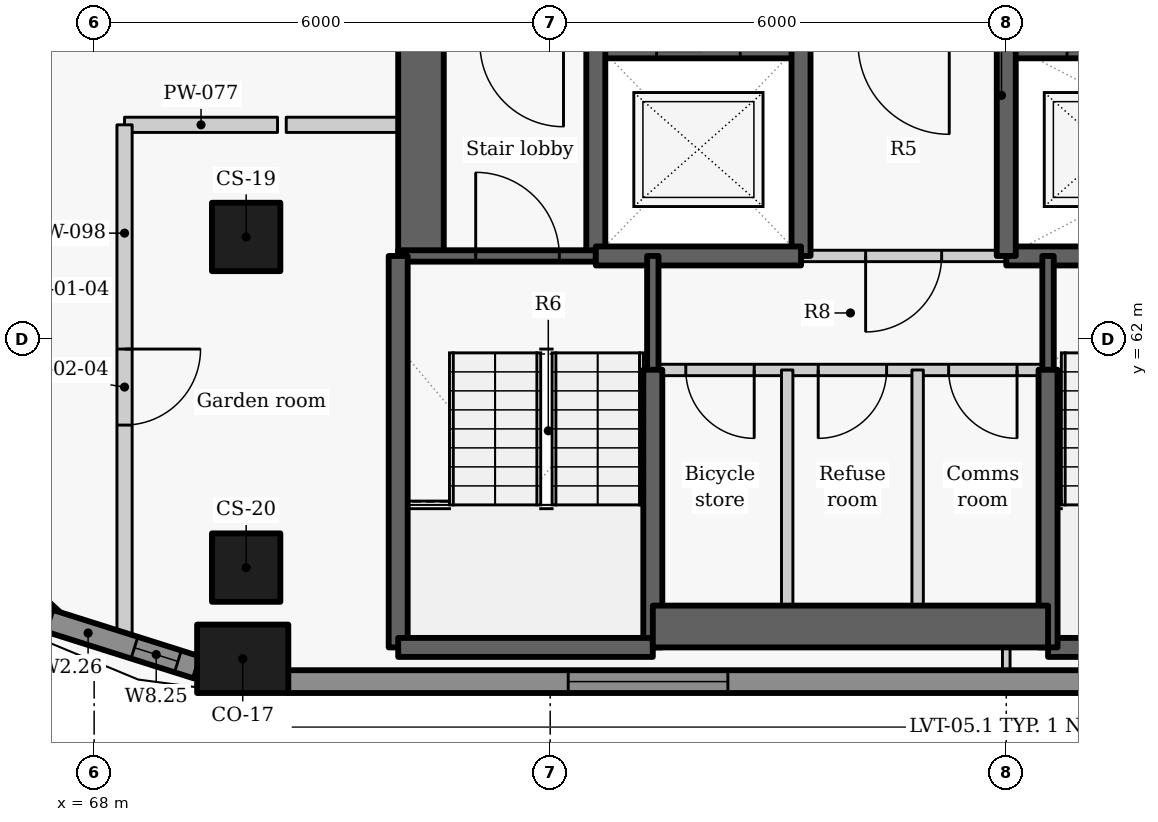
"""IFC4 building model, lengths in metres.
Left out: names, types, materials, properties, quantities, classifications, styles, units other than length and angle.
Written with IfcOpenShell. Run it as: python <this file> out.ifc"""

import sys

from ifc_helpers import new_model, si_unit, direction, frame, frame_2d, origin, origin_2d, place, context, subcontext, project, spatial, rectangle, extrude, element, fill, save


model = new_model("IFC4")
c1 = context("Model", 3, precision=1e-05, world=origin(), true_north=direction((0.0, 1.0)))
c2 = subcontext(c1, "Body", "Model", "MODEL_VIEW")
j1 = project(units=[si_unit("LENGTHUNIT", "METRE"), si_unit("PLANEANGLEUNIT", "RADIAN")], contexts=[c1])
p1 = place(None, origin())
s1 = spatial("IfcSite", under=j1, at=p1, CompositionType="ELEMENT")
p2 = place(p1, origin())
s2 = spatial("IfcBuilding", under=s1, at=p2, CompositionType="ELEMENT")
p3 = place(p2, frame((0.0, 0.0, 180.0)))
s3 = spatial("IfcBuildingStorey", under=s2, at=p3, CompositionType="ELEMENT", Elevation=180.0)
p4 = place(p3, frame((69.955, 57.8, 0.0), z_axis=(0.0, 0.0, 1.0), x_axis=(1.0, 0.0, 0.0)))
e1 = element("IfcColumn", 1, at=p4, inside=s3, PredefinedType="COLUMN", context=c2, shape_type="SweptSolid", body=[
    extrude(rectangle(XDim=1.2, YDim=0.9, at=origin_2d()), origin(), (0.0, 0.0, 1.0), 3.3),
])
for number, where, z_axis, x_axis in (
    (2, (70.0, 63.35, 0.0), (0.0, 0.0, 1.0), (0.0, -1.0, 0.0)),
    (3, (70.0, 59.0, 0.0), (0.0, 0.0, 1.0), (0.0, -1.0, 0.0)),
):
    element("IfcColumn", number, at=place(p3, frame(where, z_axis=z_axis, x_axis=x_axis)), inside=s3, PredefinedType="COLUMN", context=c2, shape_type="SweptSolid", body=[
        extrude(rectangle(XDim=0.9, YDim=0.9, at=origin_2d()), origin(), (0.0, 0.0, 1.0), 3.3),
    ])
p5 = place(p3, frame((66.022, 59.622, 0.0), z_axis=(0.0, 0.0, 1.0), x_axis=(0.734627852992, -0.678470277616, 0.0)))
e4 = element("IfcWall", 4, at=p5, inside=s3, PredefinedType="SOLIDWALL", context=c2, shape_type="SweptSolid", body=[
    extrude(rectangle(XDim=2.026, YDim=0.3, at=frame_2d((1.013, 0.0))), origin(), (0.0, 0.0, 1.0), 2.425),
])
p6 = place(p3, frame((67.406, 58.302, 0.0), z_axis=(0.0, 0.0, 1.0), x_axis=(0.953537608367, -0.301274010545, 0.0)))
e5 = element("IfcWall", 5, at=p6, inside=s3, PredefinedType="SOLIDWALL", context=c2, shape_type="SweptSolid", body=[
    extrude(rectangle(XDim=2.048, YDim=0.3, at=frame_2d((1.024, 0.0))), origin(), (0.0, 0.0, 1.0), 2.425),
])
p7 = place(p6, frame((1.18, 0.0, 0.9)))
e6 = element("IfcOpeningElement", 6, at=p7, cuts=e5, PredefinedType="OPENING", context=c2, shape_type="SweptSolid", body=[
    extrude(rectangle(XDim=0.6, YDim=1.1, at=frame_2d((0.3, 0.55))), frame((0.0, 0.16, 0.0), z_axis=(0.0, -1.0, 0.0), x_axis=(1.0, 0.0, 0.0)), (0.0, 0.0, 1.0), 0.32),
])
p8 = place(p3, frame((70.551, 57.5, 0.0), z_axis=(0.0, 0.0, 1.0), x_axis=(1.0, 0.0, 0.0)))
e7 = element("IfcWall", 7, at=p8, inside=s3, PredefinedType="SOLIDWALL", context=c2, shape_type="SweptSolid", body=[
    extrude(rectangle(XDim=18.893, YDim=0.3, at=frame_2d((9.446, 0.0))), origin(), (0.0, 0.0, 1.0), 2.425),
])
p9 = place(p8, frame((3.687, 0.0, 0.9)))
e8 = element("IfcOpeningElement", 8, at=p9, cuts=e7, PredefinedType="OPENING", context=c2, shape_type="SweptSolid", body=[
    extrude(rectangle(XDim=2.1, YDim=1.1, at=frame_2d((1.05, 0.55))), frame((0.0, 0.16, 0.0), z_axis=(0.0, -1.0, 0.0), x_axis=(1.0, 0.0, 0.0)), (0.0, 0.0, 1.0), 0.32),
])
p10 = place(p8, frame((13.109, 0.0, 0.9)))
e9 = element("IfcOpeningElement", 9, at=p10, cuts=e7, PredefinedType="OPENING", context=c2, shape_type="SweptSolid", body=[
    extrude(rectangle(XDim=2.1, YDim=1.1, at=frame_2d((1.05, 0.55))), frame((0.0, 0.16, 0.0), z_axis=(0.0, -1.0, 0.0), x_axis=(1.0, 0.0, 0.0)), (0.0, 0.0, 1.0), 0.32),
])
p11 = place(p3, frame((72.3, 63.1, -0.275), z_axis=(0.0, 0.0, 1.0), x_axis=(0.0, 1.0, 0.0)))
e10 = element("IfcWall", 10, at=p11, inside=s3, PredefinedType="SHEAR", context=c2, shape_type="SweptSolid", body=[
    extrude(rectangle(XDim=9.1, YDim=0.6, at=frame_2d((4.55, 0.0))), origin(), (0.0, 0.0, 1.0), 3.3),
])
p12 = place(p11, frame((3.748, 0.0, 0.275)))
e11 = element("IfcOpeningElement", 11, at=p12, cuts=e10, PredefinedType="OPENING", context=c2, shape_type="SweptSolid", body=[
    extrude(rectangle(XDim=1.5, YDim=2.1, at=frame_2d((0.75, 1.05))), frame((0.0, 0.31, 0.0), z_axis=(0.0, -1.0, 0.0), x_axis=(1.0, 0.0, 0.0)), (0.0, 0.0, 1.0), 0.62),
])
p13 = place(p3, frame((74.597, 65.9, -0.275), z_axis=(0.0, 0.0, 1.0), x_axis=(1.0, 0.0, 0.0)))
e12 = element("IfcWall", 12, at=p13, inside=s3, PredefinedType="SHEAR", context=c2, shape_type="SweptSolid", body=[
    extrude(rectangle(XDim=2.706, YDim=0.4, at=frame_2d((1.353, 0.0))), origin(), (0.0, 0.0, 1.0), 3.3),
])
p14 = place(p13, frame((0.803, 0.0, 0.275)))
e13 = element("IfcOpeningElement", 13, at=p14, cuts=e12, PredefinedType="OPENING", context=c2, shape_type="SweptSolid", body=[
    extrude(rectangle(XDim=1.1, YDim=2.1, at=frame_2d((0.55, 1.05))), frame((0.0, 0.21, 0.0), z_axis=(0.0, -1.0, 0.0), x_axis=(1.0, 0.0, 0.0)), (0.0, 0.0, 1.0), 0.42),
])
p15 = place(p3, frame((79.997, 65.9, -0.275), z_axis=(0.0, 0.0, 1.0), x_axis=(1.0, 0.0, 0.0)))
e14 = element("IfcWall", 14, at=p15, inside=s3, PredefinedType="SHEAR", context=c2, shape_type="SweptSolid", body=[
    extrude(rectangle(XDim=5.406, YDim=0.4, at=frame_2d((2.703, 0.0))), origin(), (0.0, 0.0, 1.0), 3.3),
])
p16 = place(p15, frame((0.803, 0.0, 0.275)))
e15 = element("IfcOpeningElement", 15, at=p16, cuts=e14, PredefinedType="OPENING", context=c2, shape_type="SweptSolid", body=[
    extrude(rectangle(XDim=1.1, YDim=2.1, at=frame_2d((0.55, 1.05))), frame((0.0, 0.21, 0.0), z_axis=(0.0, -1.0, 0.0), x_axis=(1.0, 0.0, 0.0)), (0.0, 0.0, 1.0), 0.42),
])
p17 = place(p3, frame((74.6, 63.1, -0.275), z_axis=(0.0, 0.0, 1.0), x_axis=(0.0, 1.0, 0.0)))
e16 = element("IfcWall", 16, at=p17, inside=s3, PredefinedType="SHEAR", context=c2, shape_type="SweptSolid", body=[
    extrude(rectangle(XDim=2.8, YDim=0.25, at=frame_2d((1.4, 0.0))), origin(), (0.0, 0.0, 1.0), 3.3),
])
p18 = place(p3, frame((72.0, 63.1, -0.275), z_axis=(0.0, 0.0, 1.0), x_axis=(1.0, 0.0, 0.0)))
e17 = element("IfcWall", 17, at=p18, inside=s3, PredefinedType="SHEAR", context=c2, shape_type="SweptSolid", body=[
    extrude(rectangle(XDim=2.6, YDim=0.15, at=frame_2d((1.3, 0.0))), origin(), (0.0, 0.0, 1.0), 3.3),
])
p19 = place(p18, frame((1.02, 0.0, 0.275)))
e18 = element("IfcOpeningElement", 18, at=p19, cuts=e17, PredefinedType="OPENING", context=c2, shape_type="SweptSolid", body=[
    extrude(rectangle(XDim=1.1, YDim=2.1, at=frame_2d((0.55, 1.05))), frame((0.0, 0.085, 0.0), z_axis=(0.0, -1.0, 0.0), x_axis=(1.0, 0.0, 0.0)), (0.0, 0.0, 1.0), 0.17),
])
p20 = place(p3, frame((77.3, 63.1, -0.275), z_axis=(0.0, 0.0, 1.0), x_axis=(0.0, 1.0, 0.0)))
e19 = element("IfcWall", 19, at=p20, inside=s3, PredefinedType="SHEAR", context=c2, shape_type="SweptSolid", body=[
    extrude(rectangle(XDim=2.8, YDim=0.25, at=frame_2d((1.4, 0.0))), origin(), (0.0, 0.0, 1.0), 3.3),
])
p21 = place(p3, frame((74.6, 63.1, -0.275), z_axis=(0.0, 0.0, 1.0), x_axis=(1.0, 0.0, 0.0)))
e20 = element("IfcWall", 20, at=p21, inside=s3, PredefinedType="SHEAR", context=c2, shape_type="SweptSolid", body=[
    extrude(rectangle(XDim=2.7, YDim=0.25, at=frame_2d((1.35, 0.0))), origin(), (0.0, 0.0, 1.0), 3.3),
])
p22 = place(p3, frame((80.0, 63.1, -0.275), z_axis=(0.0, 0.0, 1.0), x_axis=(1.0, 0.0, 0.0)))
e21 = element("IfcWall", 21, at=p22, inside=s3, PredefinedType="SHEAR", context=c2, shape_type="SweptSolid", body=[
    extrude(rectangle(XDim=8.0, YDim=0.25, at=frame_2d((4.0, 0.0))), origin(), (0.0, 0.0, 1.0), 3.3),
])
p23 = place(p22, frame((3.849, 0.0, 0.275)))
e22 = element("IfcOpeningElement", 22, at=p23, cuts=e21, PredefinedType="OPENING", context=c2, shape_type="SweptSolid", body=[
    extrude(rectangle(XDim=1.1, YDim=2.1, at=frame_2d((0.55, 1.05))), frame((0.0, 0.135, 0.0), z_axis=(0.0, -1.0, 0.0), x_axis=(1.0, 0.0, 0.0)), (0.0, 0.0, 1.0), 0.27),
])
p24 = place(p3, frame((80.0, 63.1, -0.275), z_axis=(0.0, 0.0, 1.0), x_axis=(0.0, 1.0, 0.0)))
e23 = element("IfcWall", 23, at=p24, inside=s3, PredefinedType="SHEAR", context=c2, shape_type="SweptSolid", body=[
    extrude(rectangle(XDim=2.8, YDim=0.25, at=frame_2d((1.4, 0.0))), origin(), (0.0, 0.0, 1.0), 3.3),
])
p25 = place(p3, frame((80.0, 63.1, 0.0), z_axis=(0.0, 0.0, 1.0), x_axis=(-1.0, 0.0, 0.0)))
e24 = element("IfcWall", 24, at=p25, inside=s3, PredefinedType="PARTITIONING", context=c2, shape_type="SweptSolid", body=[
    extrude(rectangle(XDim=2.7, YDim=0.15, at=frame_2d((1.35, 0.0))), origin(), (0.0, 0.0, 1.0), 3.025),
])
p26 = place(p25, frame((0.85, 0.0, 0.0)))
e25 = element("IfcOpeningElement", 25, at=p26, cuts=e24, PredefinedType="OPENING", context=c2, shape_type="SweptSolid", body=[
    extrude(rectangle(XDim=1.0, YDim=2.1, at=frame_2d((0.5, 1.05))), frame((0.0, 0.085, 0.0), z_axis=(0.0, -1.0, 0.0), x_axis=(1.0, 0.0, 0.0)), (0.0, 0.0, 1.0), 0.17),
])
p27 = place(p3, frame((75.35, 61.597, -0.275), z_axis=(0.0, 0.0, 1.0), x_axis=(0.0, 1.0, 0.0)))
e26 = element("IfcWall", 26, at=p27, inside=s3, PredefinedType="SHEAR", context=c2, shape_type="SweptSolid", body=[
    extrude(rectangle(XDim=1.503, YDim=0.15, at=frame_2d((0.751, 0.0))), origin(), (0.0, 0.0, 1.0), 3.3),
])
p28 = place(p3, frame((75.35, 57.95, -0.275), z_axis=(0.0, 0.0, 1.0), x_axis=(0.0, 1.0, 0.0)))
e27 = element("IfcWall", 27, at=p28, inside=s3, PredefinedType="SHEAR", context=c2, shape_type="SweptSolid", body=[
    extrude(rectangle(XDim=3.653, YDim=0.25, at=frame_2d((1.827, 0.0))), origin(), (0.0, 0.0, 1.0), 3.3),
])
p29 = place(p3, frame((72.0, 57.95, -0.275), z_axis=(0.0, 0.0, 1.0), x_axis=(0.0, 1.0, 0.0)))
e28 = element("IfcWall", 28, at=p29, inside=s3, PredefinedType="SHEAR", context=c2, shape_type="SweptSolid", body=[
    extrude(rectangle(XDim=5.15, YDim=0.25, at=frame_2d((2.575, 0.0))), origin(), (0.0, 0.0, 1.0), 3.3),
])
p30 = place(p3, frame((72.0, 57.95, -0.275), z_axis=(0.0, 0.0, 1.0), x_axis=(1.0, 0.0, 0.0)))
e29 = element("IfcWall", 29, at=p30, inside=s3, PredefinedType="SHEAR", context=c2, shape_type="SweptSolid", body=[
    extrude(rectangle(XDim=3.35, YDim=0.25, at=frame_2d((1.675, 0.0))), origin(), (0.0, 0.0, 1.0), 3.3),
])
p31 = place(p3, frame((80.55, 57.95, -0.275), z_axis=(0.0, 0.0, 1.0), x_axis=(1.0, 0.0, 0.0)))
e30 = element("IfcWall", 30, at=p31, inside=s3, PredefinedType="SHEAR", context=c2, shape_type="SweptSolid", body=[
    extrude(rectangle(XDim=2.85, YDim=0.25, at=frame_2d((1.425, 0.0))), origin(), (0.0, 0.0, 1.0), 3.3),
])
p32 = place(p3, frame((80.55, 61.597, -0.275), z_axis=(0.0, 0.0, 1.0), x_axis=(0.0, 1.0, 0.0)))
e31 = element("IfcWall", 31, at=p32, inside=s3, PredefinedType="SHEAR", context=c2, shape_type="SweptSolid", body=[
    extrude(rectangle(XDim=1.503, YDim=0.15, at=frame_2d((0.751, 0.0))), origin(), (0.0, 0.0, 1.0), 3.3),
])
p33 = place(p3, frame((80.55, 57.95, -0.275), z_axis=(0.0, 0.0, 1.0), x_axis=(0.0, 1.0, 0.0)))
e32 = element("IfcWall", 32, at=p33, inside=s3, PredefinedType="SHEAR", context=c2, shape_type="SweptSolid", body=[
    extrude(rectangle(XDim=3.653, YDim=0.25, at=frame_2d((1.827, 0.0))), origin(), (0.0, 0.0, 1.0), 3.3),
])
p34 = place(p3, frame((75.35, 58.225, -0.275), z_axis=(0.0, 0.0, 1.0), x_axis=(1.0, 0.0, 0.0)))
e33 = element("IfcWall", 33, at=p34, inside=s3, PredefinedType="SHEAR", context=c2, shape_type="SweptSolid", body=[
    extrude(rectangle(XDim=5.2, YDim=0.55, at=frame_2d((2.6, 0.0))), origin(), (0.0, 0.0, 1.0), 3.3),
])
p35 = place(p3, frame((80.55, 61.6, 0.0), z_axis=(0.0, 0.0, 1.0), x_axis=(-1.0, 0.0, 0.0)))
e34 = element("IfcWall", 34, at=p35, inside=s3, PredefinedType="PARTITIONING", context=c2, shape_type="SweptSolid", body=[
    extrude(rectangle(XDim=5.2, YDim=0.15, at=frame_2d((2.6, 0.0))), origin(), (0.0, 0.0, 1.0), 3.025),
])
p36 = place(p35, frame((3.866, 0.0, 0.0)))
e35 = element("IfcOpeningElement", 35, at=p36, cuts=e34, PredefinedType="OPENING", context=c2, shape_type="SweptSolid", body=[
    extrude(rectangle(XDim=0.9, YDim=2.1, at=frame_2d((0.45, 1.05))), frame((0.0, 0.085, 0.0), z_axis=(0.0, -1.0, 0.0), x_axis=(1.0, 0.0, 0.0)), (0.0, 0.0, 1.0), 0.17),
])
p37 = place(p35, frame((2.124, 0.0, 0.0)))
e36 = element("IfcOpeningElement", 36, at=p37, cuts=e34, PredefinedType="OPENING", context=c2, shape_type="SweptSolid", body=[
    extrude(rectangle(XDim=0.9, YDim=2.1, at=frame_2d((0.45, 1.05))), frame((0.0, 0.085, 0.0), z_axis=(0.0, -1.0, 0.0), x_axis=(1.0, 0.0, 0.0)), (0.0, 0.0, 1.0), 0.17),
])
p38 = place(p35, frame((0.408, 0.0, 0.0)))
e37 = element("IfcOpeningElement", 37, at=p38, cuts=e34, PredefinedType="OPENING", context=c2, shape_type="SweptSolid", body=[
    extrude(rectangle(XDim=0.9, YDim=2.1, at=frame_2d((0.45, 1.05))), frame((0.0, 0.085, 0.0), z_axis=(0.0, -1.0, 0.0), x_axis=(1.0, 0.0, 0.0)), (0.0, 0.0, 1.0), 0.17),
])
for number, where, z_axis, x_axis in (
    (38, (77.118, 57.95, 0.0), (0.0, 0.0, 1.0), (0.0, 1.0, 0.0)),
    (39, (78.834, 57.95, 0.0), (0.0, 0.0, 1.0), (0.0, 1.0, 0.0)),
):
    element("IfcWall", number, at=place(p3, frame(where, z_axis=z_axis, x_axis=x_axis)), inside=s3, PredefinedType="PARTITIONING", context=c2, shape_type="SweptSolid", body=[
        extrude(rectangle(XDim=3.65, YDim=0.15, at=frame_2d((1.825, 0.0))), origin(), (0.0, 0.0, 1.0), 3.025),
    ])
p39 = place(p3, frame((68.4, 64.825, 0.0), z_axis=(0.0, 0.0, 1.0), x_axis=(1.0, 0.0, 0.0)))
e40 = element("IfcWall", 40, at=p39, inside=s3, PredefinedType="PARTITIONING", context=c2, shape_type="SweptSolid", body=[
    extrude(rectangle(XDim=2.013, YDim=0.2, at=frame_2d((1.006, 0.0))), origin(), (0.0, 0.0, 1.0), 2.505),
])
p40 = place(p3, frame((70.527, 64.825, 0.0), z_axis=(0.0, 0.0, 1.0), x_axis=(1.0, 0.0, 0.0)))
e41 = element("IfcWall", 41, at=p40, inside=s3, PredefinedType="PARTITIONING", context=c2, shape_type="SweptSolid", body=[
    extrude(rectangle(XDim=1.473, YDim=0.2, at=frame_2d((0.736, 0.0))), origin(), (0.0, 0.0, 1.0), 3.025),
])
p41 = place(p3, frame((68.4, 64.825, 0.0), z_axis=(0.0, 0.0, 1.0), x_axis=(0.0, -1.0, 0.0)))
e42 = element("IfcWall", 42, at=p41, inside=s3, PredefinedType="PARTITIONING", context=c2, shape_type="SweptSolid", body=[
    extrude(rectangle(XDim=6.899, YDim=0.2, at=frame_2d((3.449, 0.0))), origin(), (0.0, 0.0, 1.0), 2.405),
])
p42 = place(p41, frame((2.95, 0.0, 0.0)))
e43 = element("IfcOpeningElement", 43, at=p42, cuts=e42, PredefinedType="OPENING", context=c2, shape_type="SweptSolid", body=[
    extrude(rectangle(XDim=1.0, YDim=2.1, at=frame_2d((0.5, 1.05))), frame((0.0, 0.11, 0.0), z_axis=(0.0, -1.0, 0.0), x_axis=(1.0, 0.0, 0.0)), (0.0, 0.0, 1.0), 0.22),
])
p43 = place(p3, frame((80.0, 57.65, 0.0), z_axis=(0.0, 0.0, 1.0), x_axis=(0.0, 1.0, 0.0)))
e44 = element("IfcWall", 44, at=p43, inside=s3, PredefinedType="PARTITIONING", context=c2, shape_type="SweptSolid", body=[
    extrude(rectangle(XDim=0.3, YDim=0.1, at=frame_2d((0.15, 0.0))), origin(), (0.0, 0.0, 1.0), 3.025),
])
p44 = place(p7, origin())
e45 = element("IfcWindow", 45, at=p44, inside=s3, PartitioningType="SINGLE_PANEL", PredefinedType="WINDOW", context=c2, shape_type="SweptSolid", body=[
    extrude(rectangle(XDim=0.6, YDim=1.1, at=frame_2d((0.3, 0.55))), frame((0.0, 0.03, 0.0), z_axis=(0.0, -1.0, 0.0), x_axis=(1.0, 0.0, 0.0)), (0.0, 0.0, 1.0), 0.06),
])
fill(e6, e45)
p45 = place(p9, origin())
e46 = element("IfcWindow", 46, at=p45, inside=s3, PartitioningType="SINGLE_PANEL", PredefinedType="WINDOW", context=c2, shape_type="SweptSolid", body=[
    extrude(rectangle(XDim=2.1, YDim=1.1, at=frame_2d((1.05, 0.55))), frame((0.0, 0.03, 0.0), z_axis=(0.0, -1.0, 0.0), x_axis=(1.0, 0.0, 0.0)), (0.0, 0.0, 1.0), 0.06),
])
fill(e8, e46)
p46 = place(p26, origin())
e47 = element("IfcDoor", 47, at=p46, inside=s3, OperationType="SINGLE_SWING_RIGHT", PredefinedType="DOOR", context=c2, shape_type="SweptSolid", body=[
    extrude(rectangle(XDim=1.0, YDim=2.1, at=frame_2d((0.5, 1.05))), frame((0.0, 0.025, 0.0), z_axis=(0.0, -1.0, 0.0), x_axis=(1.0, 0.0, 0.0)), (0.0, 0.0, 1.0), 0.05),
])
fill(e25, e47)
p47 = place(p36, origin())
e48 = element("IfcDoor", 48, at=p47, inside=s3, OperationType="SINGLE_SWING_LEFT", PredefinedType="DOOR", context=c2, shape_type="SweptSolid", body=[
    extrude(rectangle(XDim=0.9, YDim=2.1, at=frame_2d((0.45, 1.05))), frame((0.0, 0.025, 0.0), z_axis=(0.0, -1.0, 0.0), x_axis=(1.0, 0.0, 0.0)), (0.0, 0.0, 1.0), 0.05),
])
fill(e35, e48)
p48 = place(p37, origin())
e49 = element("IfcDoor", 49, at=p48, inside=s3, OperationType="SINGLE_SWING_RIGHT", PredefinedType="DOOR", context=c2, shape_type="SweptSolid", body=[
    extrude(rectangle(XDim=0.9, YDim=2.1, at=frame_2d((0.45, 1.05))), frame((0.0, 0.025, 0.0), z_axis=(0.0, -1.0, 0.0), x_axis=(1.0, 0.0, 0.0)), (0.0, 0.0, 1.0), 0.05),
])
fill(e36, e49)
p49 = place(p38, origin())
e50 = element("IfcDoor", 50, at=p49, inside=s3, OperationType="SINGLE_SWING_LEFT", PredefinedType="DOOR", context=c2, shape_type="SweptSolid", body=[
    extrude(rectangle(XDim=0.9, YDim=2.1, at=frame_2d((0.45, 1.05))), frame((0.0, 0.025, 0.0), z_axis=(0.0, -1.0, 0.0), x_axis=(1.0, 0.0, 0.0)), (0.0, 0.0, 1.0), 0.05),
])
fill(e37, e50)
p50 = place(p19, origin())
e51 = element("IfcDoor", 51, at=p50, inside=s3, OperationType="SINGLE_SWING_LEFT", PredefinedType="DOOR", context=c2, shape_type="SweptSolid", body=[
    extrude(rectangle(XDim=1.1, YDim=2.1, at=frame_2d((0.55, 1.05))), frame((0.0, 0.025, 0.0), z_axis=(0.0, -1.0, 0.0), x_axis=(1.0, 0.0, 0.0)), (0.0, 0.0, 1.0), 0.05),
])
fill(e18, e51)
p51 = place(p42, origin())
e52 = element("IfcDoor", 52, at=p51, inside=s3, OperationType="SINGLE_SWING_LEFT", PredefinedType="DOOR", context=c2, shape_type="SweptSolid", body=[
    extrude(rectangle(XDim=1.0, YDim=2.1, at=frame_2d((0.5, 1.05))), frame((0.0, 0.025, 0.0), z_axis=(0.0, -1.0, 0.0), x_axis=(1.0, 0.0, 0.0)), (0.0, 0.0, 1.0), 0.05),
])
fill(e43, e52)
save(model, sys.argv[1])
